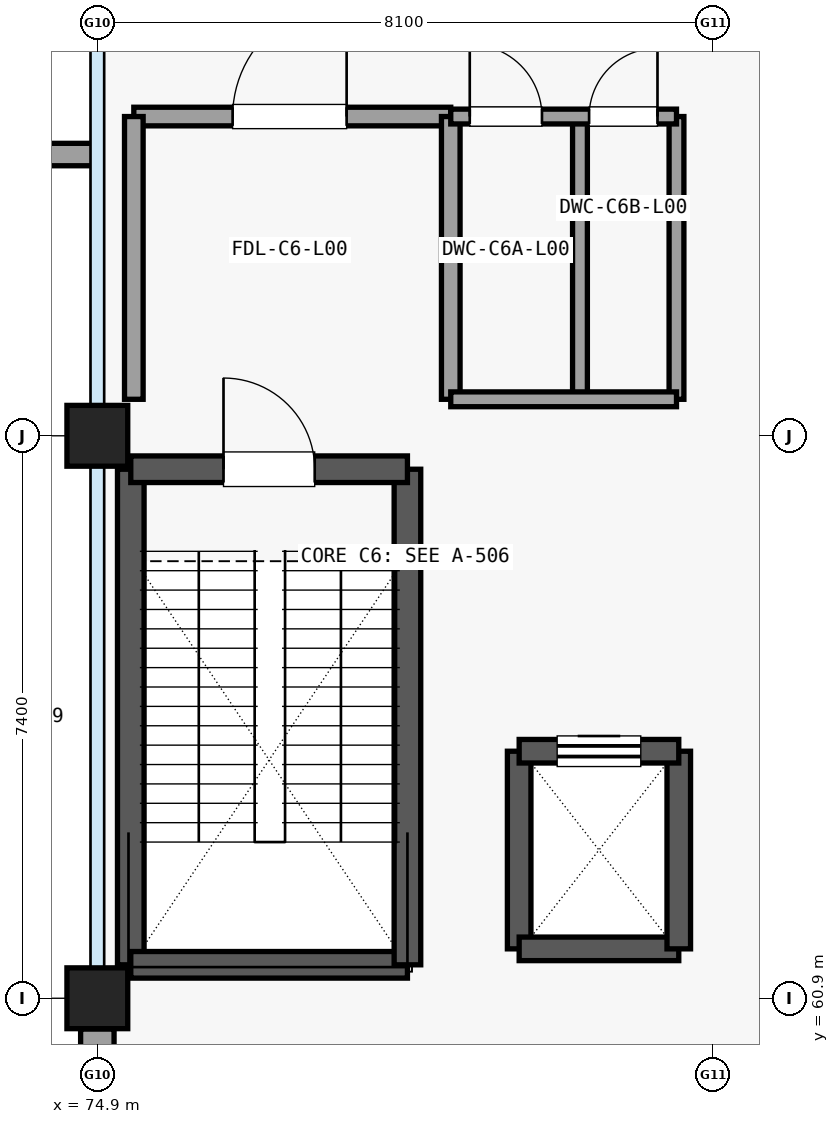
"""IFC4 building model, lengths in metres.
Left out: names, types, materials, properties, quantities, classifications, styles, units other than length and angle.
Written with IfcOpenShell. Run it as: python <this file> out.ifc"""

import sys

from ifc_helpers import new_model, si_unit, direction, frame, frame_2d, origin, origin_2d, place, context, subcontext, project, spatial, rectangle, extrude, element, fill, save


model = new_model("IFC4")
c1 = context("Model", 3, precision=1e-05, world=origin(), true_north=direction((0.0, 1.0)))
c2 = subcontext(c1, "Body", "Model", "MODEL_VIEW")
j1 = project(units=[si_unit("LENGTHUNIT", "METRE"), si_unit("PLANEANGLEUNIT", "RADIAN")], contexts=[c1])
p1 = place(None, origin())
s1 = spatial("IfcSite", under=j1, at=p1, CompositionType="ELEMENT")
p2 = place(p1, origin())
s2 = spatial("IfcBuilding", under=s1, at=p2, CompositionType="ELEMENT")
p3 = place(p2, origin())
s3 = spatial("IfcBuildingStorey", under=s2, at=p3, CompositionType="ELEMENT", Elevation=0.0)
for number, where, z_axis, x_axis in (
    (1, (74.9, 60.9, 0.0), (0.0, 0.0, 1.0), (1.0, 0.0, 0.0)),
    (2, (74.9, 68.3, 0.0), (0.0, 0.0, 1.0), (1.0, 0.0, 0.0)),
):
    element("IfcColumn", number, at=place(p3, frame(where, z_axis=z_axis, x_axis=x_axis)), inside=s3, PredefinedType="COLUMN", context=c2, shape_type="SweptSolid", body=[
        extrude(rectangle(XDim=0.8, YDim=0.8, at=origin_2d()), origin(), (0.0, 0.0, 1.0), 5.135),
    ])
p4 = place(p3, frame((74.9, 53.904, 0.0), z_axis=(0.0, 0.0, 1.0), x_axis=(0.0, 1.0, 0.0)))
e3 = element("IfcWall", 3, at=p4, inside=s3, PredefinedType="SOLIDWALL", context=c2, shape_type="SweptSolid", body=[
    extrude(rectangle(XDim=6.592, YDim=0.44, at=frame_2d((3.296, 0.0))), origin(), (0.0, 0.0, 1.0), 4.193),
])
p5 = place(p4, frame((2.196, 0.0, 0.0)))
e4 = element("IfcOpeningElement", 4, at=p5, cuts=e3, PredefinedType="OPENING", context=c2, shape_type="SweptSolid", body=[
    extrude(rectangle(XDim=2.2, YDim=2.4, at=frame_2d((1.1, 1.2))), frame((0.0, 0.23, 0.0), z_axis=(0.0, -1.0, 0.0), x_axis=(1.0, 0.0, 0.0)), (0.0, 0.0, 1.0), 0.46),
])
p6 = place(p3, frame((50.61, 72.0, 0.0), z_axis=(0.0, 0.0, 1.0), x_axis=(1.0, 0.0, 0.0)))
e5 = element("IfcWall", 5, at=p6, inside=s3, PredefinedType="SOLIDWALL", context=c2, shape_type="SweptSolid", body=[
    extrude(rectangle(XDim=24.28, YDim=0.295, at=frame_2d((12.14, 0.0))), origin(), (0.0, 0.0, 1.0), 3.1),
])
p7 = place(p6, frame((10.94, 0.0, 0.0)))
e6 = element("IfcOpeningElement", 6, at=p7, cuts=e5, PredefinedType="OPENING", context=c2, shape_type="SweptSolid", body=[
    extrude(rectangle(XDim=2.4, YDim=2.2, at=frame_2d((1.2, 1.1))), frame((0.0, 0.157, 0.0), z_axis=(0.0, -1.0, 0.0), x_axis=(1.0, 0.0, 0.0)), (0.0, 0.0, 1.0), 0.315),
])
p8 = place(p3, frame((75.34, 61.34, 0.0), z_axis=(0.0, 0.0, 1.0), x_axis=(0.0, 1.0, 0.0)))
e7 = element("IfcWall", 7, at=p8, inside=s3, PredefinedType="SHEAR", context=c2, shape_type="SweptSolid", body=[
    extrude(rectangle(XDim=6.52, YDim=0.35, at=frame_2d((3.26, 0.0))), origin(), (0.0, 0.0, 1.0), 5.13),
])
p9 = place(p3, frame((75.34, 61.34, 0.0), z_axis=(0.0, 0.0, 1.0), x_axis=(1.0, 0.0, 0.0)))
e8 = element("IfcWall", 8, at=p9, inside=s3, PredefinedType="SHEAR", context=c2, shape_type="SweptSolid", body=[
    extrude(rectangle(XDim=3.64, YDim=0.35, at=frame_2d((1.82, 0.0))), origin(), (0.0, 0.0, 1.0), 5.13),
])
p10 = place(p3, frame((78.98, 61.34, 0.0), z_axis=(0.0, 0.0, 1.0), x_axis=(0.0, 1.0, 0.0)))
e9 = element("IfcWall", 9, at=p10, inside=s3, PredefinedType="SHEAR", context=c2, shape_type="SweptSolid", body=[
    extrude(rectangle(XDim=6.52, YDim=0.35, at=frame_2d((3.26, 0.0))), origin(), (0.0, 0.0, 1.0), 5.13),
])
p11 = place(p3, frame((75.34, 67.86, 0.0), z_axis=(0.0, 0.0, 1.0), x_axis=(1.0, 0.0, 0.0)))
e10 = element("IfcWall", 10, at=p11, inside=s3, PredefinedType="SHEAR", context=c2, shape_type="SweptSolid", body=[
    extrude(rectangle(XDim=3.64, YDim=0.35, at=frame_2d((1.82, 0.0))), origin(), (0.0, 0.0, 1.0), 5.13),
])
p12 = place(p11, frame((1.22, 0.0, 0.0)))
e11 = element("IfcOpeningElement", 11, at=p12, cuts=e10, PredefinedType="OPENING", context=c2, shape_type="SweptSolid", body=[
    extrude(rectangle(XDim=1.2, YDim=2.15, at=frame_2d((0.6, 1.075))), frame((0.0, 0.185, 0.0), z_axis=(0.0, -1.0, 0.0), x_axis=(1.0, 0.0, 0.0)), (0.0, 0.0, 1.0), 0.37),
])
p13 = place(p3, frame((80.45, 61.55, 0.0), z_axis=(0.0, 0.0, 1.0), x_axis=(0.0, 1.0, 0.0)))
e12 = element("IfcWall", 12, at=p13, inside=s3, PredefinedType="SHEAR", context=c2, shape_type="SweptSolid", body=[
    extrude(rectangle(XDim=2.6, YDim=0.31, at=frame_2d((1.3, 0.0))), origin(), (0.0, 0.0, 1.0), 5.13),
])
p14 = place(p3, frame((80.45, 61.55, 0.0), z_axis=(0.0, 0.0, 1.0), x_axis=(1.0, 0.0, 0.0)))
e13 = element("IfcWall", 13, at=p14, inside=s3, PredefinedType="SHEAR", context=c2, shape_type="SweptSolid", body=[
    extrude(rectangle(XDim=2.1, YDim=0.31, at=frame_2d((1.05, 0.0))), origin(), (0.0, 0.0, 1.0), 5.13),
])
p15 = place(p3, frame((82.55, 61.55, 0.0), z_axis=(0.0, 0.0, 1.0), x_axis=(0.0, 1.0, 0.0)))
e14 = element("IfcWall", 14, at=p15, inside=s3, PredefinedType="SHEAR", context=c2, shape_type="SweptSolid", body=[
    extrude(rectangle(XDim=2.6, YDim=0.31, at=frame_2d((1.3, 0.0))), origin(), (0.0, 0.0, 1.0), 5.13),
])
p16 = place(p3, frame((80.45, 64.15, 0.0), z_axis=(0.0, 0.0, 1.0), x_axis=(1.0, 0.0, 0.0)))
e15 = element("IfcWall", 15, at=p16, inside=s3, PredefinedType="SHEAR", context=c2, shape_type="SweptSolid", body=[
    extrude(rectangle(XDim=2.1, YDim=0.31, at=frame_2d((1.05, 0.0))), origin(), (0.0, 0.0, 1.0), 5.13),
])
p17 = place(p16, frame((0.5, 0.0, 0.0)))
e16 = element("IfcOpeningElement", 16, at=p17, cuts=e15, PredefinedType="OPENING", context=c2, shape_type="SweptSolid", body=[
    extrude(rectangle(XDim=1.1, YDim=2.15, at=frame_2d((0.55, 1.075))), frame((0.0, 0.165, 0.0), z_axis=(0.0, -1.0, 0.0), x_axis=(1.0, 0.0, 0.0)), (0.0, 0.0, 1.0), 0.33),
])
p18 = place(p3, frame((75.38, 72.5, 0.0), z_axis=(0.0, 0.0, 1.0), x_axis=(1.0, 0.0, 0.0)))
e17 = element("IfcWall", 17, at=p18, inside=s3, PredefinedType="PARTITIONING", context=c2, shape_type="SweptSolid", body=[
    extrude(rectangle(XDim=4.17, YDim=0.245, at=frame_2d((2.085, 0.0))), origin(), (0.0, 0.0, 1.0), 4.198),
])
p19 = place(p18, frame((1.3, 0.0, 0.0)))
e18 = element("IfcOpeningElement", 18, at=p19, cuts=e17, PredefinedType="OPENING", context=c2, shape_type="SweptSolid", body=[
    extrude(rectangle(XDim=1.5, YDim=2.15, at=frame_2d((0.75, 1.075))), frame((0.0, 0.133, 0.0), z_axis=(0.0, -1.0, 0.0), x_axis=(1.0, 0.0, 0.0)), (0.0, 0.0, 1.0), 0.265),
])
for number, where, z_axis, x_axis in (
    (19, (75.38, 68.78, 0.0), (0.0, 0.0, 1.0), (0.0, 1.0, 0.0)),
    (20, (79.55, 68.78, 0.0), (0.0, 0.0, 1.0), (0.0, 1.0, 0.0)),
):
    element("IfcWall", number, at=place(p3, frame(where, z_axis=z_axis, x_axis=x_axis)), inside=s3, PredefinedType="PARTITIONING", context=c2, shape_type="SweptSolid", body=[
        extrude(rectangle(XDim=3.72, YDim=0.245, at=frame_2d((1.86, 0.0))), origin(), (0.0, 0.0, 1.0), 4.198),
    ])
for number, where, z_axis, x_axis in (
    (21, (81.25, 68.78, 0.0), (0.0, 0.0, 1.0), (0.0, 1.0, 0.0)),
    (22, (82.52, 68.78, 0.0), (0.0, 0.0, 1.0), (0.0, 1.0, 0.0)),
):
    element("IfcWall", number, at=place(p3, frame(where, z_axis=z_axis, x_axis=x_axis)), inside=s3, PredefinedType="PARTITIONING", context=c2, shape_type="SweptSolid", body=[
        extrude(rectangle(XDim=3.72, YDim=0.195, at=frame_2d((1.86, 0.0))), origin(), (0.0, 0.0, 1.0), 4.198),
    ])
p20 = place(p3, frame((79.55, 68.78, 0.0), z_axis=(0.0, 0.0, 1.0), x_axis=(1.0, 0.0, 0.0)))
e23 = element("IfcWall", 23, at=p20, inside=s3, PredefinedType="PARTITIONING", context=c2, shape_type="SweptSolid", body=[
    extrude(rectangle(XDim=2.97, YDim=0.195, at=frame_2d((1.485, 0.0))), origin(), (0.0, 0.0, 1.0), 4.198),
])
p21 = place(p3, frame((79.55, 72.5, 0.0), z_axis=(0.0, 0.0, 1.0), x_axis=(1.0, 0.0, 0.0)))
e24 = element("IfcWall", 24, at=p21, inside=s3, PredefinedType="PARTITIONING", context=c2, shape_type="SweptSolid", body=[
    extrude(rectangle(XDim=2.97, YDim=0.195, at=frame_2d((1.485, 0.0))), origin(), (0.0, 0.0, 1.0), 4.198),
])
p22 = place(p21, frame((0.25, 0.0, 0.0)))
e25 = element("IfcOpeningElement", 25, at=p22, cuts=e24, PredefinedType="OPENING", context=c2, shape_type="SweptSolid", body=[
    extrude(rectangle(XDim=0.95, YDim=2.1, at=frame_2d((0.475, 1.05))), frame((0.0, 0.107, 0.0), z_axis=(0.0, -1.0, 0.0), x_axis=(1.0, 0.0, 0.0)), (0.0, 0.0, 1.0), 0.215),
])
p23 = place(p21, frame((1.82, 0.0, 0.0)))
e26 = element("IfcOpeningElement", 26, at=p23, cuts=e24, PredefinedType="OPENING", context=c2, shape_type="SweptSolid", body=[
    extrude(rectangle(XDim=0.9, YDim=2.1, at=frame_2d((0.45, 1.05))), frame((0.0, 0.107, 0.0), z_axis=(0.0, -1.0, 0.0), x_axis=(1.0, 0.0, 0.0)), (0.0, 0.0, 1.0), 0.215),
])
p24 = place(p12, origin())
e27 = element("IfcDoor", 27, at=p24, inside=s3, OperationType="SINGLE_SWING_LEFT", PredefinedType="DOOR", context=c2, shape_type="SweptSolid", body=[
    extrude(rectangle(XDim=1.2, YDim=2.15, at=frame_2d((0.6, 1.075))), frame((0.0, 0.025, 0.0), z_axis=(0.0, -1.0, 0.0), x_axis=(1.0, 0.0, 0.0)), (0.0, 0.0, 1.0), 0.05),
])
fill(e11, e27)
p25 = place(p17, origin())
e28 = element("IfcDoor", 28, at=p25, inside=s3, OperationType="SLIDING_TO_RIGHT", PredefinedType="DOOR", context=c2, shape_type="SweptSolid", body=[
    extrude(rectangle(XDim=1.1, YDim=2.15, at=frame_2d((0.55, 1.075))), frame((0.0, 0.025, 0.0), z_axis=(0.0, -1.0, 0.0), x_axis=(1.0, 0.0, 0.0)), (0.0, 0.0, 1.0), 0.05),
])
fill(e16, e28)
p26 = place(p19, origin())
e29 = element("IfcDoor", 29, at=p26, inside=s3, OperationType="SINGLE_SWING_RIGHT", PredefinedType="DOOR", context=c2, shape_type="SweptSolid", body=[
    extrude(rectangle(XDim=1.5, YDim=2.15, at=frame_2d((0.75, 1.075))), frame((0.0, 0.025, 0.0), z_axis=(0.0, -1.0, 0.0), x_axis=(1.0, 0.0, 0.0)), (0.0, 0.0, 1.0), 0.05),
])
fill(e18, e29)
p27 = place(p22, origin())
e30 = element("IfcDoor", 30, at=p27, inside=s3, OperationType="SINGLE_SWING_LEFT", PredefinedType="DOOR", context=c2, shape_type="SweptSolid", body=[
    extrude(rectangle(XDim=0.95, YDim=2.1, at=frame_2d((0.475, 1.05))), frame((0.0, 0.025, 0.0), z_axis=(0.0, -1.0, 0.0), x_axis=(1.0, 0.0, 0.0)), (0.0, 0.0, 1.0), 0.05),
])
fill(e25, e30)
p28 = place(p23, origin())
e31 = element("IfcDoor", 31, at=p28, inside=s3, OperationType="SINGLE_SWING_RIGHT", PredefinedType="DOOR", context=c2, shape_type="SweptSolid", body=[
    extrude(rectangle(XDim=0.9, YDim=2.1, at=frame_2d((0.45, 1.05))), frame((0.0, 0.025, 0.0), z_axis=(0.0, -1.0, 0.0), x_axis=(1.0, 0.0, 0.0)), (0.0, 0.0, 1.0), 0.05),
])
fill(e26, e31)
save(model, sys.argv[1])
